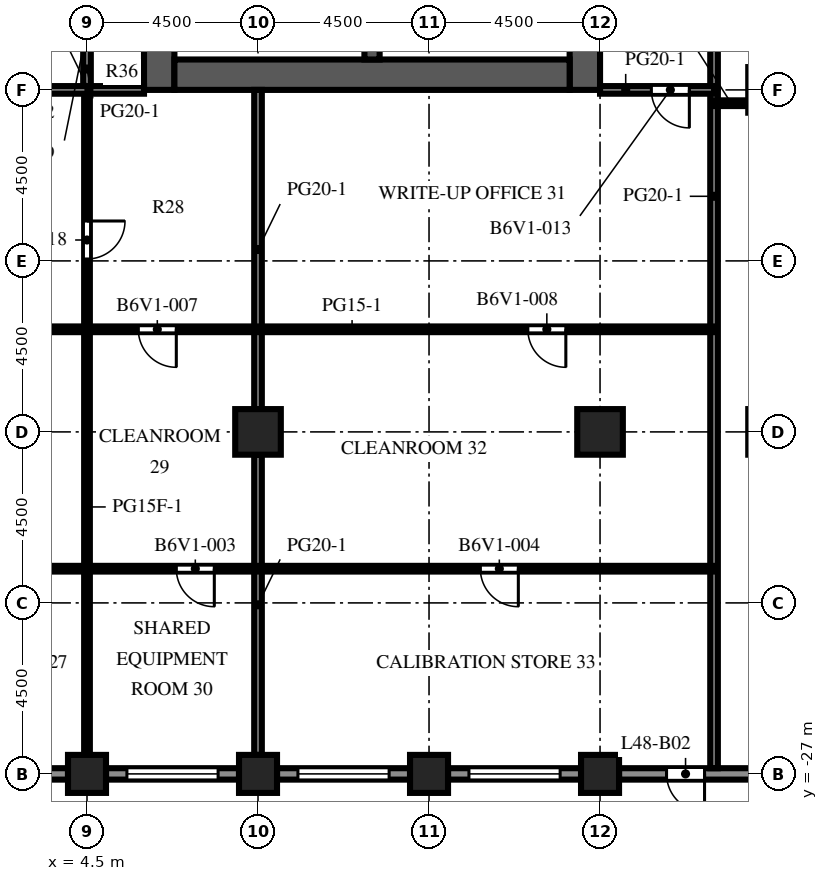
"""IFC4 building model, lengths in metres.
Left out: names, types, materials, properties, quantities, classifications, styles, units other than length and angle.
Written with IfcOpenShell. Run it as: python <this file> out.ifc"""

import sys

from ifc_helpers import new_model, si_unit, direction, frame, frame_2d, origin, origin_2d, place, context, subcontext, project, spatial, rectangle, extrude, element, fill, save


model = new_model("IFC4")
c1 = context("Model", 3, precision=1e-05, world=origin(), true_north=direction((0.0, 1.0)))
c2 = subcontext(c1, "Body", "Model", "MODEL_VIEW")
j1 = project(units=[si_unit("LENGTHUNIT", "METRE"), si_unit("PLANEANGLEUNIT", "RADIAN")], contexts=[c1])
p1 = place(None, origin())
s1 = spatial("IfcSite", under=j1, at=p1, CompositionType="ELEMENT")
p2 = place(p1, origin())
s2 = spatial("IfcBuilding", under=s1, at=p2, CompositionType="ELEMENT")
p3 = place(p2, frame((0.0, 0.0, 212.0)))
s3 = spatial("IfcBuildingStorey", under=s2, at=p3, CompositionType="ELEMENT", Elevation=212.0)
for number, where, z_axis, x_axis in (
    (1, (4.5, -27.0, 0.0), (0.0, 0.0, 1.0), (1.0, 0.0, 0.0)),
    (2, (9.0, -27.0, 0.0), (0.0, 0.0, 1.0), (1.0, 0.0, 0.0)),
    (3, (13.5, -27.0, 0.0), (0.0, 0.0, 1.0), (1.0, 0.0, 0.0)),
    (4, (18.0, -27.0, 0.0), (0.0, 0.0, 1.0), (1.0, 0.0, 0.0)),
):
    element("IfcColumn", number, at=place(p3, frame(where, z_axis=z_axis, x_axis=x_axis)), inside=s3, PredefinedType="COLUMN", context=c2, shape_type="SweptSolid", body=[
        extrude(rectangle(XDim=1.0, YDim=1.0, at=origin_2d()), origin(), (0.0, 0.0, 1.0), 4.1),
    ])
for number, where, z_axis, x_axis in (
    (5, (9.0, -18.0, 0.0), (0.0, 0.0, 1.0), (1.0, 0.0, 0.0)),
    (6, (18.0, -18.0, 0.0), (0.0, 0.0, 1.0), (1.0, 0.0, 0.0)),
):
    element("IfcColumn", number, at=place(p3, frame(where, z_axis=z_axis, x_axis=x_axis)), inside=s3, PredefinedType="COLUMN", context=c2, shape_type="SweptSolid", body=[
        extrude(rectangle(XDim=1.2, YDim=1.2, at=origin_2d()), origin(), (0.0, 0.0, 1.0), 4.1),
    ])
p4 = place(p3, frame((6.4, -9.0, 0.0), z_axis=(0.0, 0.0, 1.0), x_axis=(0.0, 1.0, 0.0)))
e7 = element("IfcWall", 7, at=p4, inside=s3, PredefinedType="SHEAR", context=c2, shape_type="SweptSolid", body=[
    extrude(rectangle(XDim=27.5, YDim=0.8, at=frame_2d((13.75, 0.0))), origin(), (0.0, 0.0, 1.0), 4.1),
])
p5 = place(p4, frame((12.55, 0.0, 0.0)))
e8 = element("IfcOpeningElement", 8, at=p5, cuts=e7, PredefinedType="OPENING", context=c2, shape_type="SweptSolid", body=[
    extrude(rectangle(XDim=2.4, YDim=2.4, at=frame_2d((1.2, 1.2))), frame((0.0, 0.41, 0.0), z_axis=(0.0, -1.0, 0.0), x_axis=(1.0, 0.0, 0.0)), (0.0, 0.0, 1.0), 0.82),
])
p6 = place(p4, frame((3.95, 0.0, 0.0)))
e9 = element("IfcOpeningElement", 9, at=p6, cuts=e7, PredefinedType="OPENING", context=c2, shape_type="SweptSolid", body=[
    extrude(rectangle(XDim=1.2, YDim=2.1, at=frame_2d((0.6, 1.05))), frame((0.0, 0.41, 0.0), z_axis=(0.0, -1.0, 0.0), x_axis=(1.0, 0.0, 0.0)), (0.0, 0.0, 1.0), 0.82),
])
p7 = place(p4, frame((22.35, 0.0, 0.0)))
e10 = element("IfcOpeningElement", 10, at=p7, cuts=e7, PredefinedType="OPENING", context=c2, shape_type="SweptSolid", body=[
    extrude(rectangle(XDim=1.2, YDim=2.1, at=frame_2d((0.6, 1.05))), frame((0.0, 0.41, 0.0), z_axis=(0.0, -1.0, 0.0), x_axis=(1.0, 0.0, 0.0)), (0.0, 0.0, 1.0), 0.82),
])
p8 = place(p3, frame((17.6, -9.0, 0.0), z_axis=(0.0, 0.0, 1.0), x_axis=(0.0, 1.0, 0.0)))
e11 = element("IfcWall", 11, at=p8, inside=s3, PredefinedType="SHEAR", context=c2, shape_type="SweptSolid", body=[
    extrude(rectangle(XDim=27.5, YDim=0.8, at=frame_2d((13.75, 0.0))), origin(), (0.0, 0.0, 1.0), 4.1),
])
p9 = place(p8, frame((12.55, 0.0, 0.0)))
e12 = element("IfcOpeningElement", 12, at=p9, cuts=e11, PredefinedType="OPENING", context=c2, shape_type="SweptSolid", body=[
    extrude(rectangle(XDim=2.4, YDim=2.4, at=frame_2d((1.2, 1.2))), frame((0.0, 0.41, 0.0), z_axis=(0.0, -1.0, 0.0), x_axis=(1.0, 0.0, 0.0)), (0.0, 0.0, 1.0), 0.82),
])
p10 = place(p8, frame((6.825, 0.0, 0.0)))
e13 = element("IfcOpeningElement", 13, at=p10, cuts=e11, PredefinedType="OPENING", context=c2, shape_type="SweptSolid", body=[
    extrude(rectangle(XDim=1.2, YDim=2.1, at=frame_2d((0.6, 1.05))), frame((0.0, 0.41, 0.0), z_axis=(0.0, -1.0, 0.0), x_axis=(1.0, 0.0, 0.0)), (0.0, 0.0, 1.0), 0.82),
])
p11 = place(p8, frame((19.475, 0.0, 0.0)))
e14 = element("IfcOpeningElement", 14, at=p11, cuts=e11, PredefinedType="OPENING", context=c2, shape_type="SweptSolid", body=[
    extrude(rectangle(XDim=1.2, YDim=2.1, at=frame_2d((0.6, 1.05))), frame((0.0, 0.41, 0.0), z_axis=(0.0, -1.0, 0.0), x_axis=(1.0, 0.0, 0.0)), (0.0, 0.0, 1.0), 0.82),
])
p12 = place(p3, frame((6.8, -8.6, 0.0), z_axis=(0.0, 0.0, 1.0), x_axis=(1.0, 0.0, 0.0)))
e15 = element("IfcWall", 15, at=p12, inside=s3, PredefinedType="SHEAR", context=c2, shape_type="SweptSolid", body=[
    extrude(rectangle(XDim=10.4, YDim=0.8, at=frame_2d((5.2, 0.0))), origin(), (0.0, 0.0, 1.0), 4.1),
])
p13 = place(p3, frame((12.0, -8.2, 0.0), z_axis=(0.0, 0.0, 1.0), x_axis=(0.0, 1.0, 0.0)))
e16 = element("IfcWall", 16, at=p13, inside=s3, PredefinedType="SHEAR", context=c2, shape_type="SweptSolid", body=[
    extrude(rectangle(XDim=7.5, YDim=0.4, at=frame_2d((3.75, 0.0))), origin(), (0.0, 0.0, 1.0), 4.1),
])
p14 = place(p3, frame((4.0, -27.0, 0.0), z_axis=(0.0, 0.0, 1.0), x_axis=(-1.0, 0.0, 0.0)))
e17 = element("IfcWall", 17, at=p14, inside=s3, PredefinedType="SOLIDWALL", context=c2, shape_type="SweptSolid", body=[
    extrude(rectangle(XDim=3.5, YDim=0.3, at=frame_2d((1.75, 0.0))), origin(), (0.0, 0.0, 1.0), 2.85),
])
p15 = place(p14, frame((0.55, 0.0, 0.8)))
e18 = element("IfcOpeningElement", 18, at=p15, cuts=e17, PredefinedType="OPENING", context=c2, shape_type="SweptSolid", body=[
    extrude(rectangle(XDim=2.4, YDim=1.7, at=frame_2d((1.2, 0.85))), frame((0.0, 0.16, 0.0), z_axis=(0.0, -1.0, 0.0), x_axis=(1.0, 0.0, 0.0)), (0.0, 0.0, 1.0), 0.32),
])
p16 = place(p3, frame((8.5, -27.0, 0.0), z_axis=(0.0, 0.0, 1.0), x_axis=(-1.0, 0.0, 0.0)))
e19 = element("IfcWall", 19, at=p16, inside=s3, PredefinedType="SOLIDWALL", context=c2, shape_type="SweptSolid", body=[
    extrude(rectangle(XDim=3.5, YDim=0.3, at=frame_2d((1.75, 0.0))), origin(), (0.0, 0.0, 1.0), 2.85),
])
p17 = place(p16, frame((0.55, 0.0, 0.8)))
e20 = element("IfcOpeningElement", 20, at=p17, cuts=e19, PredefinedType="OPENING", context=c2, shape_type="SweptSolid", body=[
    extrude(rectangle(XDim=2.4, YDim=1.7, at=frame_2d((1.2, 0.85))), frame((0.0, 0.16, 0.0), z_axis=(0.0, -1.0, 0.0), x_axis=(1.0, 0.0, 0.0)), (0.0, 0.0, 1.0), 0.32),
])
p18 = place(p3, frame((13.0, -27.0, 0.0), z_axis=(0.0, 0.0, 1.0), x_axis=(-1.0, 0.0, 0.0)))
e21 = element("IfcWall", 21, at=p18, inside=s3, PredefinedType="SOLIDWALL", context=c2, shape_type="SweptSolid", body=[
    extrude(rectangle(XDim=3.5, YDim=0.3, at=frame_2d((1.75, 0.0))), origin(), (0.0, 0.0, 1.0), 2.85),
])
p19 = place(p18, frame((0.55, 0.0, 0.8)))
e22 = element("IfcOpeningElement", 22, at=p19, cuts=e21, PredefinedType="OPENING", context=c2, shape_type="SweptSolid", body=[
    extrude(rectangle(XDim=2.4, YDim=1.7, at=frame_2d((1.2, 0.85))), frame((0.0, 0.16, 0.0), z_axis=(0.0, -1.0, 0.0), x_axis=(1.0, 0.0, 0.0)), (0.0, 0.0, 1.0), 0.32),
])
p20 = place(p3, frame((17.5, -27.0, 0.0), z_axis=(0.0, 0.0, 1.0), x_axis=(-1.0, 0.0, 0.0)))
e23 = element("IfcWall", 23, at=p20, inside=s3, PredefinedType="SOLIDWALL", context=c2, shape_type="SweptSolid", body=[
    extrude(rectangle(XDim=3.5, YDim=0.3, at=frame_2d((1.75, 0.0))), origin(), (0.0, 0.0, 1.0), 2.85),
])
p21 = place(p20, frame((0.55, 0.0, 0.8)))
e24 = element("IfcOpeningElement", 24, at=p21, cuts=e23, PredefinedType="OPENING", context=c2, shape_type="SweptSolid", body=[
    extrude(rectangle(XDim=2.4, YDim=1.7, at=frame_2d((1.2, 0.85))), frame((0.0, 0.16, 0.0), z_axis=(0.0, -1.0, 0.0), x_axis=(1.0, 0.0, 0.0)), (0.0, 0.0, 1.0), 0.32),
])
p22 = place(p3, frame((22.0, -27.0, 0.0), z_axis=(0.0, 0.0, 1.0), x_axis=(-1.0, 0.0, 0.0)))
e25 = element("IfcWall", 25, at=p22, inside=s3, PredefinedType="SOLIDWALL", context=c2, shape_type="SweptSolid", body=[
    extrude(rectangle(XDim=3.5, YDim=0.3, at=frame_2d((1.75, 0.0))), origin(), (0.0, 0.0, 1.0), 2.85),
])
p23 = place(p22, frame((1.25, 0.0, 0.0)))
e26 = element("IfcOpeningElement", 26, at=p23, cuts=e25, PredefinedType="OPENING", context=c2, shape_type="SweptSolid", body=[
    extrude(rectangle(XDim=1.0, YDim=2.2, at=frame_2d((0.5, 1.1))), frame((0.0, 0.16, 0.0), z_axis=(0.0, -1.0, 0.0), x_axis=(1.0, 0.0, 0.0)), (0.0, 0.0, 1.0), 0.32),
])
p24 = place(p3, frame((8.3, -8.2, 0.0), z_axis=(0.0, 0.0, 1.0), x_axis=(0.0, 1.0, 0.0)))
e27 = element("IfcWall", 27, at=p24, inside=s3, PredefinedType="PARTITIONING", context=c2, shape_type="SweptSolid", body=[
    extrude(rectangle(XDim=2.25, YDim=0.1, at=frame_2d((1.125, 0.0))), origin(), (0.0, 0.0, 1.0), 3.65),
])
p25 = place(p24, frame((0.625, 0.0, 0.0)))
e28 = element("IfcOpeningElement", 28, at=p25, cuts=e27, PredefinedType="OPENING", context=c2, shape_type="SweptSolid", body=[
    extrude(rectangle(XDim=1.0, YDim=2.1, at=frame_2d((0.5, 1.05))), frame((0.0, 0.06, 0.0), z_axis=(0.0, -1.0, 0.0), x_axis=(1.0, 0.0, 0.0)), (0.0, 0.0, 1.0), 0.12),
])
p26 = place(p3, frame((4.5, -9.0, 0.0), z_axis=(0.0, 0.0, 1.0), x_axis=(0.0, -1.0, 0.0)))
e29 = element("IfcWall", 29, at=p26, inside=s3, PredefinedType="PARTITIONING", context=c2, shape_type="SweptSolid", body=[
    extrude(rectangle(XDim=17.5, YDim=0.15, at=frame_2d((8.75, 0.0))), origin(), (0.0, 0.0, 1.0), 3.65),
])
p27 = place(p26, frame((3.45, 0.0, 0.0)))
e30 = element("IfcOpeningElement", 30, at=p27, cuts=e29, PredefinedType="OPENING", context=c2, shape_type="SweptSolid", body=[
    extrude(rectangle(XDim=1.0, YDim=2.1, at=frame_2d((0.5, 1.05))), frame((0.0, 0.085, 0.0), z_axis=(0.0, -1.0, 0.0), x_axis=(1.0, 0.0, 0.0)), (0.0, 0.0, 1.0), 0.17),
])
p28 = place(p3, frame((4.5, -6.0, 0.0), z_axis=(0.0, 0.0, 1.0), x_axis=(0.0, -1.0, 0.0)))
e31 = element("IfcWall", 31, at=p28, inside=s3, PredefinedType="PARTITIONING", context=c2, shape_type="SweptSolid", body=[
    extrude(rectangle(XDim=3.0, YDim=0.2, at=frame_2d((1.5, 0.0))), origin(), (0.0, 0.0, 1.0), 3.65),
])
p29 = place(p28, frame((0.9, 0.0, 0.0)))
e32 = element("IfcOpeningElement", 32, at=p29, cuts=e31, PredefinedType="OPENING", context=c2, shape_type="SweptSolid", body=[
    extrude(rectangle(XDim=1.0, YDim=2.1, at=frame_2d((0.5, 1.05))), frame((0.0, 0.11, 0.0), z_axis=(0.0, -1.0, 0.0), x_axis=(1.0, 0.0, 0.0)), (0.0, 0.0, 1.0), 0.22),
])
p30 = place(p3, frame((9.0, -26.5, 0.0), z_axis=(0.0, 0.0, 1.0), x_axis=(0.0, 1.0, 0.0)))
e33 = element("IfcWall", 33, at=p30, inside=s3, PredefinedType="PARTITIONING", context=c2, shape_type="SweptSolid", body=[
    extrude(rectangle(XDim=7.9, YDim=0.2, at=frame_2d((3.95, 0.0))), origin(), (0.0, 0.0, 1.0), 3.65),
])
p31 = place(p3, frame((9.0, -17.4, 0.0), z_axis=(0.0, 0.0, 1.0), x_axis=(0.0, 1.0, 0.0)))
e34 = element("IfcWall", 34, at=p31, inside=s3, PredefinedType="PARTITIONING", context=c2, shape_type="SweptSolid", body=[
    extrude(rectangle(XDim=8.4, YDim=0.2, at=frame_2d((4.2, 0.0))), origin(), (0.0, 0.0, 1.0), 3.65),
])
p32 = place(p3, frame((21.0, -26.85, 0.0), z_axis=(0.0, 0.0, 1.0), x_axis=(0.0, 1.0, 0.0)))
e35 = element("IfcWall", 35, at=p32, inside=s3, PredefinedType="PARTITIONING", context=c2, shape_type="SweptSolid", body=[
    extrude(rectangle(XDim=30.1, YDim=0.2, at=frame_2d((15.05, 0.0))), origin(), (0.0, 0.0, 1.0), 3.65),
])
p33 = place(p3, frame((21.0, -21.6, 0.0), z_axis=(0.0, 0.0, 1.0), x_axis=(-1.0, 0.0, 0.0)))
e36 = element("IfcWall", 36, at=p33, inside=s3, PredefinedType="PARTITIONING", context=c2, shape_type="SweptSolid", body=[
    extrude(rectangle(XDim=34.5, YDim=0.15, at=frame_2d((17.25, 0.0))), origin(), (0.0, 0.0, 1.0), 3.65),
])
p34 = place(p33, frame((29.9, 0.0, 0.0)))
e37 = element("IfcOpeningElement", 37, at=p34, cuts=e36, PredefinedType="OPENING", context=c2, shape_type="SweptSolid", body=[
    extrude(rectangle(XDim=1.0, YDim=2.1, at=frame_2d((0.5, 1.05))), frame((0.0, 0.085, 0.0), z_axis=(0.0, -1.0, 0.0), x_axis=(1.0, 0.0, 0.0)), (0.0, 0.0, 1.0), 0.17),
])
p35 = place(p33, frame((21.4, 0.0, 0.0)))
e38 = element("IfcOpeningElement", 38, at=p35, cuts=e36, PredefinedType="OPENING", context=c2, shape_type="SweptSolid", body=[
    extrude(rectangle(XDim=1.0, YDim=2.1, at=frame_2d((0.5, 1.05))), frame((0.0, 0.085, 0.0), z_axis=(0.0, -1.0, 0.0), x_axis=(1.0, 0.0, 0.0)), (0.0, 0.0, 1.0), 0.17),
])
p36 = place(p33, frame((13.15, 0.0, 0.0)))
e39 = element("IfcOpeningElement", 39, at=p36, cuts=e36, PredefinedType="OPENING", context=c2, shape_type="SweptSolid", body=[
    extrude(rectangle(XDim=1.0, YDim=2.1, at=frame_2d((0.5, 1.05))), frame((0.0, 0.085, 0.0), z_axis=(0.0, -1.0, 0.0), x_axis=(1.0, 0.0, 0.0)), (0.0, 0.0, 1.0), 0.17),
])
p37 = place(p33, frame((5.15, 0.0, 0.0)))
e40 = element("IfcOpeningElement", 40, at=p37, cuts=e36, PredefinedType="OPENING", context=c2, shape_type="SweptSolid", body=[
    extrude(rectangle(XDim=1.0, YDim=2.1, at=frame_2d((0.5, 1.05))), frame((0.0, 0.085, 0.0), z_axis=(0.0, -1.0, 0.0), x_axis=(1.0, 0.0, 0.0)), (0.0, 0.0, 1.0), 0.17),
])
p38 = place(p3, frame((21.0, -15.3, 0.0), z_axis=(0.0, 0.0, 1.0), x_axis=(-1.0, 0.0, 0.0)))
e41 = element("IfcWall", 41, at=p38, inside=s3, PredefinedType="PARTITIONING", context=c2, shape_type="SweptSolid", body=[
    extrude(rectangle(XDim=34.5, YDim=0.15, at=frame_2d((17.25, 0.0))), origin(), (0.0, 0.0, 1.0), 3.65),
])
p39 = place(p38, frame((28.9, 0.0, 0.0)))
e42 = element("IfcOpeningElement", 42, at=p39, cuts=e41, PredefinedType="OPENING", context=c2, shape_type="SweptSolid", body=[
    extrude(rectangle(XDim=1.0, YDim=2.1, at=frame_2d((0.5, 1.05))), frame((0.0, 0.085, 0.0), z_axis=(0.0, -1.0, 0.0), x_axis=(1.0, 0.0, 0.0)), (0.0, 0.0, 1.0), 0.17),
])
p40 = place(p38, frame((19.4, 0.0, 0.0)))
e43 = element("IfcOpeningElement", 43, at=p40, cuts=e41, PredefinedType="OPENING", context=c2, shape_type="SweptSolid", body=[
    extrude(rectangle(XDim=1.0, YDim=2.1, at=frame_2d((0.5, 1.05))), frame((0.0, 0.085, 0.0), z_axis=(0.0, -1.0, 0.0), x_axis=(1.0, 0.0, 0.0)), (0.0, 0.0, 1.0), 0.17),
])
p41 = place(p38, frame((14.15, 0.0, 0.0)))
e44 = element("IfcOpeningElement", 44, at=p41, cuts=e41, PredefinedType="OPENING", context=c2, shape_type="SweptSolid", body=[
    extrude(rectangle(XDim=1.0, YDim=2.1, at=frame_2d((0.5, 1.05))), frame((0.0, 0.085, 0.0), z_axis=(0.0, -1.0, 0.0), x_axis=(1.0, 0.0, 0.0)), (0.0, 0.0, 1.0), 0.17),
])
p42 = place(p38, frame((3.9, 0.0, 0.0)))
e45 = element("IfcOpeningElement", 45, at=p42, cuts=e41, PredefinedType="OPENING", context=c2, shape_type="SweptSolid", body=[
    extrude(rectangle(XDim=1.0, YDim=2.1, at=frame_2d((0.5, 1.05))), frame((0.0, 0.085, 0.0), z_axis=(0.0, -1.0, 0.0), x_axis=(1.0, 0.0, 0.0)), (0.0, 0.0, 1.0), 0.17),
])
p43 = place(p3, frame((21.0, -9.35, 0.0), z_axis=(0.0, 0.0, 1.0), x_axis=(1.0, 0.0, 0.0)))
e46 = element("IfcWall", 46, at=p43, inside=s3, PredefinedType="PARTITIONING", context=c2, shape_type="SweptSolid", body=[
    extrude(rectangle(XDim=0.9, YDim=0.15, at=frame_2d((0.45, 0.0))), origin(), (0.0, 0.0, 1.0), 3.65),
])
p44 = place(p3, frame((6.0, -9.0, 0.0), z_axis=(0.0, 0.0, 1.0), x_axis=(-1.0, 0.0, 0.0)))
e47 = element("IfcWall", 47, at=p44, inside=s3, PredefinedType="PARTITIONING", context=c2, shape_type="SweptSolid", body=[
    extrude(rectangle(XDim=4.5, YDim=0.2, at=frame_2d((2.25, 0.0))), origin(), (0.0, 0.0, 1.0), 3.65),
])
p45 = place(p44, frame((2.9, 0.0, 0.0)))
e48 = element("IfcOpeningElement", 48, at=p45, cuts=e47, PredefinedType="OPENING", context=c2, shape_type="SweptSolid", body=[
    extrude(rectangle(XDim=1.0, YDim=2.1, at=frame_2d((0.5, 1.05))), frame((0.0, 0.11, 0.0), z_axis=(0.0, -1.0, 0.0), x_axis=(1.0, 0.0, 0.0)), (0.0, 0.0, 1.0), 0.22),
])
p46 = place(p3, frame((21.0, -9.0, 0.0), z_axis=(0.0, 0.0, 1.0), x_axis=(-1.0, 0.0, 0.0)))
e49 = element("IfcWall", 49, at=p46, inside=s3, PredefinedType="PARTITIONING", context=c2, shape_type="SweptSolid", body=[
    extrude(rectangle(XDim=3.0, YDim=0.2, at=frame_2d((1.5, 0.0))), origin(), (0.0, 0.0, 1.0), 3.65),
])
p47 = place(p46, frame((0.65, 0.0, 0.0)))
e50 = element("IfcOpeningElement", 50, at=p47, cuts=e49, PredefinedType="OPENING", context=c2, shape_type="SweptSolid", body=[
    extrude(rectangle(XDim=1.0, YDim=2.1, at=frame_2d((0.5, 1.05))), frame((0.0, 0.11, 0.0), z_axis=(0.0, -1.0, 0.0), x_axis=(1.0, 0.0, 0.0)), (0.0, 0.0, 1.0), 0.22),
])
p48 = place(p17, origin())
e51 = element("IfcWindow", 51, at=p48, inside=s3, PartitioningType="SINGLE_PANEL", PredefinedType="WINDOW", context=c2, shape_type="SweptSolid", body=[
    extrude(rectangle(XDim=2.4, YDim=1.7, at=frame_2d((1.2, 0.85))), frame((0.0, 0.03, 0.0), z_axis=(0.0, -1.0, 0.0), x_axis=(1.0, 0.0, 0.0)), (0.0, 0.0, 1.0), 0.06),
])
fill(e20, e51)
p49 = place(p19, origin())
e52 = element("IfcWindow", 52, at=p49, inside=s3, PartitioningType="SINGLE_PANEL", PredefinedType="WINDOW", context=c2, shape_type="SweptSolid", body=[
    extrude(rectangle(XDim=2.4, YDim=1.7, at=frame_2d((1.2, 0.85))), frame((0.0, 0.03, 0.0), z_axis=(0.0, -1.0, 0.0), x_axis=(1.0, 0.0, 0.0)), (0.0, 0.0, 1.0), 0.06),
])
fill(e22, e52)
p50 = place(p21, origin())
e53 = element("IfcWindow", 53, at=p50, inside=s3, PartitioningType="SINGLE_PANEL", PredefinedType="WINDOW", context=c2, shape_type="SweptSolid", body=[
    extrude(rectangle(XDim=2.4, YDim=1.7, at=frame_2d((1.2, 0.85))), frame((0.0, 0.03, 0.0), z_axis=(0.0, -1.0, 0.0), x_axis=(1.0, 0.0, 0.0)), (0.0, 0.0, 1.0), 0.06),
])
fill(e24, e53)
p51 = place(p23, origin())
e54 = element("IfcDoor", 54, at=p51, inside=s3, OperationType="SINGLE_SWING_LEFT", PredefinedType="DOOR", context=c2, shape_type="SweptSolid", body=[
    extrude(rectangle(XDim=1.0, YDim=2.2, at=frame_2d((0.5, 1.1))), frame((0.0, 0.025, 0.0), z_axis=(0.0, -1.0, 0.0), x_axis=(1.0, 0.0, 0.0)), (0.0, 0.0, 1.0), 0.05),
])
fill(e26, e54)
p52 = place(p36, origin())
e55 = element("IfcDoor", 55, at=p52, inside=s3, OperationType="SINGLE_SWING_LEFT", PredefinedType="DOOR", context=c2, shape_type="SweptSolid", body=[
    extrude(rectangle(XDim=1.0, YDim=2.1, at=frame_2d((0.5, 1.05))), frame((0.0, 0.025, 0.0), z_axis=(0.0, -1.0, 0.0), x_axis=(1.0, 0.0, 0.0)), (0.0, 0.0, 1.0), 0.05),
])
fill(e39, e55)
p53 = place(p37, origin())
e56 = element("IfcDoor", 56, at=p53, inside=s3, OperationType="SINGLE_SWING_LEFT", PredefinedType="DOOR", context=c2, shape_type="SweptSolid", body=[
    extrude(rectangle(XDim=1.0, YDim=2.1, at=frame_2d((0.5, 1.05))), frame((0.0, 0.025, 0.0), z_axis=(0.0, -1.0, 0.0), x_axis=(1.0, 0.0, 0.0)), (0.0, 0.0, 1.0), 0.05),
])
fill(e40, e56)
p54 = place(p41, origin())
e57 = element("IfcDoor", 57, at=p54, inside=s3, OperationType="SINGLE_SWING_LEFT", PredefinedType="DOOR", context=c2, shape_type="SweptSolid", body=[
    extrude(rectangle(XDim=1.0, YDim=2.1, at=frame_2d((0.5, 1.05))), frame((0.0, 0.025, 0.0), z_axis=(0.0, -1.0, 0.0), x_axis=(1.0, 0.0, 0.0)), (0.0, 0.0, 1.0), 0.05),
])
fill(e44, e57)
p55 = place(p42, origin())
e58 = element("IfcDoor", 58, at=p55, inside=s3, OperationType="SINGLE_SWING_LEFT", PredefinedType="DOOR", context=c2, shape_type="SweptSolid", body=[
    extrude(rectangle(XDim=1.0, YDim=2.1, at=frame_2d((0.5, 1.05))), frame((0.0, 0.025, 0.0), z_axis=(0.0, -1.0, 0.0), x_axis=(1.0, 0.0, 0.0)), (0.0, 0.0, 1.0), 0.05),
])
fill(e45, e58)
p56 = place(p47, origin())
e59 = element("IfcDoor", 59, at=p56, inside=s3, OperationType="SINGLE_SWING_LEFT", PredefinedType="DOOR", context=c2, shape_type="SweptSolid", body=[
    extrude(rectangle(XDim=1.0, YDim=2.1, at=frame_2d((0.5, 1.05))), frame((0.0, 0.025, 0.0), z_axis=(0.0, -1.0, 0.0), x_axis=(1.0, 0.0, 0.0)), (0.0, 0.0, 1.0), 0.05),
])
fill(e50, e59)
p57 = place(p27, origin())
e60 = element("IfcDoor", 60, at=p57, inside=s3, OperationType="SINGLE_SWING_LEFT", PredefinedType="DOOR", context=c2, shape_type="SweptSolid", body=[
    extrude(rectangle(XDim=1.0, YDim=2.1, at=frame_2d((0.5, 1.05))), frame((0.0, 0.025, 0.0), z_axis=(0.0, -1.0, 0.0), x_axis=(1.0, 0.0, 0.0)), (0.0, 0.0, 1.0), 0.05),
])
fill(e30, e60)
save(model, sys.argv[1])
